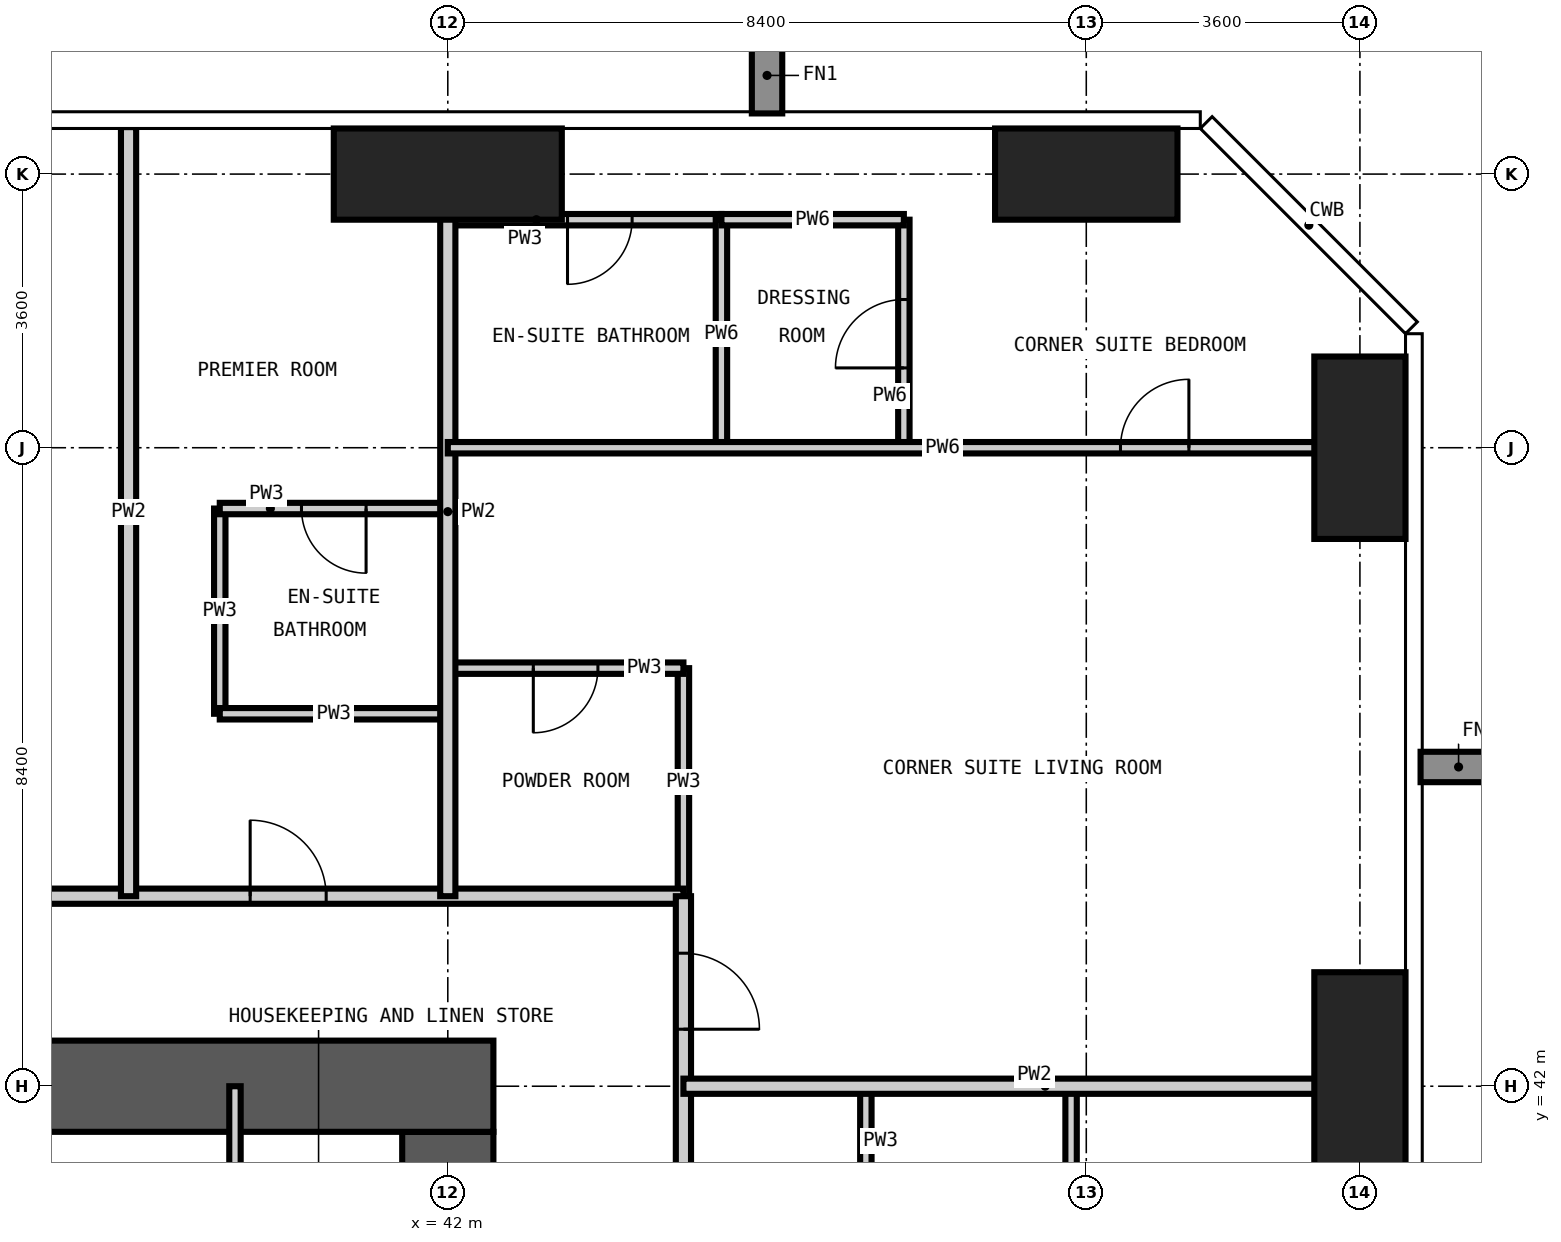
"""IFC4 building model, lengths in metres.
Left out: names, types, materials, properties, quantities, classifications, styles, units other than length and angle.
Written with IfcOpenShell. Run it as: python <this file> out.ifc"""

import sys

from ifc_helpers import new_model, si_unit, direction, frame, frame_2d, origin, origin_2d, place, context, subcontext, project, spatial, rectangle, extrude, element, fill, save


model = new_model("IFC4")
c1 = context("Model", 3, precision=1e-05, world=origin(), true_north=direction((0.0, 1.0)))
c2 = subcontext(c1, "Body", "Model", "MODEL_VIEW")
j1 = project(units=[si_unit("LENGTHUNIT", "METRE"), si_unit("PLANEANGLEUNIT", "RADIAN")], contexts=[c1])
p1 = place(None, origin())
s1 = spatial("IfcSite", under=j1, at=p1, CompositionType="ELEMENT")
p2 = place(p1, origin())
s2 = spatial("IfcBuilding", under=s1, at=p2, CompositionType="ELEMENT")
p3 = place(p2, frame((0.0, 0.0, 144.0)))
s3 = spatial("IfcBuildingStorey", under=s2, at=p3, CompositionType="ELEMENT", Elevation=144.0)
p4 = place(p3, frame((42.0, 54.0, -0.35), z_axis=(0.0, 0.0, 1.0), x_axis=(1.0, 0.0, 0.0)))
e1 = element("IfcColumn", 1, at=p4, inside=s3, PredefinedType="COLUMN", context=c2, shape_type="SweptSolid", body=[
    extrude(rectangle(XDim=3.0, YDim=1.2, at=origin_2d()), origin(), (0.0, 0.0, 1.0), 3.6),
])
p5 = place(p3, frame((50.4, 54.0, -0.35), z_axis=(0.0, 0.0, 1.0), x_axis=(1.0, 0.0, 0.0)))
e2 = element("IfcColumn", 2, at=p5, inside=s3, PredefinedType="COLUMN", context=c2, shape_type="SweptSolid", body=[
    extrude(rectangle(XDim=2.4, YDim=1.2, at=origin_2d()), origin(), (0.0, 0.0, 1.0), 3.6),
])
p6 = place(p3, frame((54.0, 42.0, -0.35), z_axis=(0.0, 0.0, 1.0), x_axis=(1.0, 0.0, 0.0)))
e3 = element("IfcColumn", 3, at=p6, inside=s3, PredefinedType="COLUMN", context=c2, shape_type="SweptSolid", body=[
    extrude(rectangle(XDim=1.2, YDim=3.0, at=origin_2d()), origin(), (0.0, 0.0, 1.0), 3.6),
])
p7 = place(p3, frame((54.0, 50.4, -0.35), z_axis=(0.0, 0.0, 1.0), x_axis=(1.0, 0.0, 0.0)))
e4 = element("IfcColumn", 4, at=p7, inside=s3, PredefinedType="COLUMN", context=c2, shape_type="SweptSolid", body=[
    extrude(rectangle(XDim=1.2, YDim=2.4, at=origin_2d()), origin(), (0.0, 0.0, 1.0), 3.6),
])
p8 = place(p3, frame((42.0, 17.4, -0.35), z_axis=(0.0, 0.0, 1.0), x_axis=(0.0, 1.0, 0.0)))
e5 = element("IfcWall", 5, at=p8, inside=s3, PredefinedType="SHEAR", context=c2, shape_type="SweptSolid", body=[
    extrude(rectangle(XDim=24.0, YDim=1.2, at=frame_2d((12.0, 0.0))), origin(), (0.0, 0.0, 1.0), 3.6),
])
p9 = place(p8, frame((0.2, 0.0, 0.35)))
e6 = element("IfcOpeningElement", 6, at=p9, cuts=e5, PredefinedType="OPENING", context=c2, shape_type="SweptSolid", body=[
    extrude(rectangle(XDim=1.2, YDim=2.2, at=frame_2d((0.6, 1.1))), frame((0.0, 0.61, 0.0), z_axis=(0.0, -1.0, 0.0), x_axis=(1.0, 0.0, 0.0)), (0.0, 0.0, 1.0), 1.22),
])
p10 = place(p8, frame((11.1, 0.0, 0.35)))
e7 = element("IfcOpeningElement", 7, at=p10, cuts=e5, PredefinedType="OPENING", context=c2, shape_type="SweptSolid", body=[
    extrude(rectangle(XDim=1.8, YDim=2.2, at=frame_2d((0.9, 1.1))), frame((0.0, 0.61, 0.0), z_axis=(0.0, -1.0, 0.0), x_axis=(1.0, 0.0, 0.0)), (0.0, 0.0, 1.0), 1.22),
])
p11 = place(p8, frame((19.9, 0.0, 0.35)))
e8 = element("IfcOpeningElement", 8, at=p11, cuts=e5, PredefinedType="OPENING", context=c2, shape_type="SweptSolid", body=[
    extrude(rectangle(XDim=1.0, YDim=2.1, at=frame_2d((0.5, 1.05))), frame((0.0, 0.61, 0.0), z_axis=(0.0, -1.0, 0.0), x_axis=(1.0, 0.0, 0.0)), (0.0, 0.0, 1.0), 1.22),
])
p12 = place(p3, frame((42.6, 42.0, -0.35), z_axis=(0.0, 0.0, 1.0), x_axis=(-1.0, 0.0, 0.0)))
e9 = element("IfcWall", 9, at=p12, inside=s3, PredefinedType="SHEAR", context=c2, shape_type="SweptSolid", body=[
    extrude(rectangle(XDim=26.4, YDim=1.2, at=frame_2d((13.2, 0.0))), origin(), (0.0, 0.0, 1.0), 3.6),
])
p13 = place(p12, frame((21.1, 0.0, 0.35)))
e10 = element("IfcOpeningElement", 10, at=p13, cuts=e9, PredefinedType="OPENING", context=c2, shape_type="SweptSolid", body=[
    extrude(rectangle(XDim=1.0, YDim=2.1, at=frame_2d((0.5, 1.05))), frame((0.0, 0.61, 0.0), z_axis=(0.0, -1.0, 0.0), x_axis=(1.0, 0.0, 0.0)), (0.0, 0.0, 1.0), 1.22),
])
p14 = place(p12, frame((10.5, 0.0, 0.35)))
e11 = element("IfcOpeningElement", 11, at=p14, cuts=e9, PredefinedType="OPENING", context=c2, shape_type="SweptSolid", body=[
    extrude(rectangle(XDim=1.2, YDim=2.2, at=frame_2d((0.6, 1.1))), frame((0.0, 0.61, 0.0), z_axis=(0.0, -1.0, 0.0), x_axis=(1.0, 0.0, 0.0)), (0.0, 0.0, 1.0), 1.22),
])
p15 = place(p3, frame((39.0, 46.9, 0.0), z_axis=(0.0, 0.0, 1.0), x_axis=(0.0, 1.0, 0.0)))
e12 = element("IfcWall", 12, at=p15, inside=s3, PredefinedType="PARTITIONING", context=c2, shape_type="SweptSolid", body=[
    extrude(rectangle(XDim=2.7, YDim=0.15, at=frame_2d((1.35, 0.0))), origin(), (0.0, 0.0, 1.0), 3.25),
])
p16 = place(p3, frame((45.1, 44.5, 0.0), z_axis=(0.0, 0.0, 1.0), x_axis=(0.0, 1.0, 0.0)))
e13 = element("IfcWall", 13, at=p16, inside=s3, PredefinedType="PARTITIONING", context=c2, shape_type="SweptSolid", body=[
    extrude(rectangle(XDim=3.0, YDim=0.15, at=frame_2d((1.5, 0.0))), origin(), (0.0, 0.0, 1.0), 3.25),
])
p17 = place(p3, frame((47.5, 39.0, 0.0), z_axis=(0.0, 0.0, 1.0), x_axis=(0.0, 1.0, 0.0)))
e14 = element("IfcWall", 14, at=p17, inside=s3, PredefinedType="PARTITIONING", context=c2, shape_type="SweptSolid", body=[
    extrude(rectangle(XDim=3.0, YDim=0.15, at=frame_2d((1.5, 0.0))), origin(), (0.0, 0.0, 1.0), 3.25),
])
p18 = place(p17, frame((1.075, 0.0, 0.0)))
e15 = element("IfcOpeningElement", 15, at=p18, cuts=e14, PredefinedType="OPENING", context=c2, shape_type="SweptSolid", body=[
    extrude(rectangle(XDim=0.85, YDim=2.1, at=frame_2d((0.425, 1.05))), frame((0.0, 0.085, 0.0), z_axis=(0.0, -1.0, 0.0), x_axis=(1.0, 0.0, 0.0)), (0.0, 0.0, 1.0), 0.17),
])
for number, where, z_axis, x_axis in (
    (16, (50.2, 39.0, 0.0), (0.0, 0.0, 1.0), (0.0, 1.0, 0.0)),
    (17, (39.0, 46.9, 0.0), (0.0, 0.0, 1.0), (1.0, 0.0, 0.0)),
):
    element("IfcWall", number, at=place(p3, frame(where, z_axis=z_axis, x_axis=x_axis)), inside=s3, PredefinedType="PARTITIONING", context=c2, shape_type="SweptSolid", body=[
        extrude(rectangle(XDim=3.0, YDim=0.15, at=frame_2d((1.5, 0.0))), origin(), (0.0, 0.0, 1.0), 3.25),
    ])
p19 = place(p3, frame((42.0, 47.5, 0.0), z_axis=(0.0, 0.0, 1.0), x_axis=(1.0, 0.0, 0.0)))
e18 = element("IfcWall", 18, at=p19, inside=s3, PredefinedType="PARTITIONING", context=c2, shape_type="SweptSolid", body=[
    extrude(rectangle(XDim=3.1, YDim=0.15, at=frame_2d((1.55, 0.0))), origin(), (0.0, 0.0, 1.0), 3.25),
])
p20 = place(p19, frame((1.125, 0.0, 0.0)))
e19 = element("IfcOpeningElement", 19, at=p20, cuts=e18, PredefinedType="OPENING", context=c2, shape_type="SweptSolid", body=[
    extrude(rectangle(XDim=0.85, YDim=2.1, at=frame_2d((0.425, 1.05))), frame((0.0, 0.085, 0.0), z_axis=(0.0, -1.0, 0.0), x_axis=(1.0, 0.0, 0.0)), (0.0, 0.0, 1.0), 0.17),
])
p21 = place(p3, frame((39.0, 49.6, 0.0), z_axis=(0.0, 0.0, 1.0), x_axis=(1.0, 0.0, 0.0)))
e20 = element("IfcWall", 20, at=p21, inside=s3, PredefinedType="PARTITIONING", context=c2, shape_type="SweptSolid", body=[
    extrude(rectangle(XDim=3.0, YDim=0.15, at=frame_2d((1.5, 0.0))), origin(), (0.0, 0.0, 1.0), 3.25),
])
p22 = place(p21, frame((1.075, 0.0, 0.0)))
e21 = element("IfcOpeningElement", 21, at=p22, cuts=e20, PredefinedType="OPENING", context=c2, shape_type="SweptSolid", body=[
    extrude(rectangle(XDim=0.85, YDim=2.1, at=frame_2d((0.425, 1.05))), frame((0.0, 0.085, 0.0), z_axis=(0.0, -1.0, 0.0), x_axis=(1.0, 0.0, 0.0)), (0.0, 0.0, 1.0), 0.17),
])
p23 = place(p3, frame((42.0, 53.4, 0.0), z_axis=(0.0, 0.0, 1.0), x_axis=(1.0, 0.0, 0.0)))
e22 = element("IfcWall", 22, at=p23, inside=s3, PredefinedType="PARTITIONING", context=c2, shape_type="SweptSolid", body=[
    extrude(rectangle(XDim=3.6, YDim=0.15, at=frame_2d((1.8, 0.0))), origin(), (0.0, 0.0, 1.0), 3.25),
])
p24 = place(p23, frame((1.575, 0.0, 0.0)))
e23 = element("IfcOpeningElement", 23, at=p24, cuts=e22, PredefinedType="OPENING", context=c2, shape_type="SweptSolid", body=[
    extrude(rectangle(XDim=0.85, YDim=2.1, at=frame_2d((0.425, 1.05))), frame((0.0, 0.085, 0.0), z_axis=(0.0, -1.0, 0.0), x_axis=(1.0, 0.0, 0.0)), (0.0, 0.0, 1.0), 0.17),
])
p25 = place(p3, frame((12.6, 44.5, 0.0), z_axis=(0.0, 0.0, 1.0), x_axis=(1.0, 0.0, 0.0)))
e24 = element("IfcWall", 24, at=p25, inside=s3, PredefinedType="PARTITIONING", context=c2, shape_type="SweptSolid", body=[
    extrude(rectangle(XDim=32.5, YDim=0.2, at=frame_2d((16.25, 0.0))), origin(), (0.0, 0.0, 1.0), 3.25),
])
p26 = place(p25, frame((5.8, 0.0, 0.0)))
e25 = element("IfcOpeningElement", 25, at=p26, cuts=e24, PredefinedType="OPENING", context=c2, shape_type="SweptSolid", body=[
    extrude(rectangle(XDim=1.0, YDim=2.2, at=frame_2d((0.5, 1.1))), frame((0.0, 0.11, 0.0), z_axis=(0.0, -1.0, 0.0), x_axis=(1.0, 0.0, 0.0)), (0.0, 0.0, 1.0), 0.22),
])
p27 = place(p25, frame((12.1, 0.0, 0.0)))
e26 = element("IfcOpeningElement", 26, at=p27, cuts=e24, PredefinedType="OPENING", context=c2, shape_type="SweptSolid", body=[
    extrude(rectangle(XDim=1.0, YDim=2.2, at=frame_2d((0.5, 1.1))), frame((0.0, 0.11, 0.0), z_axis=(0.0, -1.0, 0.0), x_axis=(1.0, 0.0, 0.0)), (0.0, 0.0, 1.0), 0.22),
])
p28 = place(p25, frame((20.5, 0.0, 0.0)))
e27 = element("IfcOpeningElement", 27, at=p28, cuts=e24, PredefinedType="OPENING", context=c2, shape_type="SweptSolid", body=[
    extrude(rectangle(XDim=1.0, YDim=2.2, at=frame_2d((0.5, 1.1))), frame((0.0, 0.11, 0.0), z_axis=(0.0, -1.0, 0.0), x_axis=(1.0, 0.0, 0.0)), (0.0, 0.0, 1.0), 0.22),
])
p29 = place(p25, frame((26.8, 0.0, 0.0)))
e28 = element("IfcOpeningElement", 28, at=p29, cuts=e24, PredefinedType="OPENING", context=c2, shape_type="SweptSolid", body=[
    extrude(rectangle(XDim=1.0, YDim=2.2, at=frame_2d((0.5, 1.1))), frame((0.0, 0.11, 0.0), z_axis=(0.0, -1.0, 0.0), x_axis=(1.0, 0.0, 0.0)), (0.0, 0.0, 1.0), 0.22),
])
p30 = place(p3, frame((45.1, 44.5, 0.0), z_axis=(0.0, 0.0, 1.0), x_axis=(0.0, -1.0, 0.0)))
e29 = element("IfcWall", 29, at=p30, inside=s3, PredefinedType="PARTITIONING", context=c2, shape_type="SweptSolid", body=[
    extrude(rectangle(XDim=31.4, YDim=0.2, at=frame_2d((15.7, 0.0))), origin(), (0.0, 0.0, 1.0), 3.25),
])
p31 = place(p30, frame((24.2, 0.0, 0.0)))
e30 = element("IfcOpeningElement", 30, at=p31, cuts=e29, PredefinedType="OPENING", context=c2, shape_type="SweptSolid", body=[
    extrude(rectangle(XDim=1.0, YDim=2.2, at=frame_2d((0.5, 1.1))), frame((0.0, 0.11, 0.0), z_axis=(0.0, -1.0, 0.0), x_axis=(1.0, 0.0, 0.0)), (0.0, 0.0, 1.0), 0.22),
])
p32 = place(p30, frame((13.4, 0.0, 0.0)))
e31 = element("IfcOpeningElement", 31, at=p32, cuts=e29, PredefinedType="OPENING", context=c2, shape_type="SweptSolid", body=[
    extrude(rectangle(XDim=1.0, YDim=2.2, at=frame_2d((0.5, 1.1))), frame((0.0, 0.11, 0.0), z_axis=(0.0, -1.0, 0.0), x_axis=(1.0, 0.0, 0.0)), (0.0, 0.0, 1.0), 0.22),
])
p33 = place(p30, frame((7.4, 0.0, 0.0)))
e32 = element("IfcOpeningElement", 32, at=p33, cuts=e29, PredefinedType="OPENING", context=c2, shape_type="SweptSolid", body=[
    extrude(rectangle(XDim=1.0, YDim=2.2, at=frame_2d((0.5, 1.1))), frame((0.0, 0.11, 0.0), z_axis=(0.0, -1.0, 0.0), x_axis=(1.0, 0.0, 0.0)), (0.0, 0.0, 1.0), 0.22),
])
p34 = place(p30, frame((29.05, 0.0, 0.0)))
e33 = element("IfcOpeningElement", 33, at=p34, cuts=e29, PredefinedType="OPENING", context=c2, shape_type="SweptSolid", body=[
    extrude(rectangle(XDim=1.0, YDim=2.2, at=frame_2d((0.5, 1.1))), frame((0.0, 0.11, 0.0), z_axis=(0.0, -1.0, 0.0), x_axis=(1.0, 0.0, 0.0)), (0.0, 0.0, 1.0), 0.22),
])
p35 = place(p30, frame((0.75, 0.0, 0.0)))
e34 = element("IfcOpeningElement", 34, at=p35, cuts=e29, PredefinedType="OPENING", context=c2, shape_type="SweptSolid", body=[
    extrude(rectangle(XDim=1.0, YDim=2.2, at=frame_2d((0.5, 1.1))), frame((0.0, 0.11, 0.0), z_axis=(0.0, -1.0, 0.0), x_axis=(1.0, 0.0, 0.0)), (0.0, 0.0, 1.0), 0.22),
])
for number, where, z_axis, x_axis in (
    (35, (37.8, 44.5, 0.0), (0.0, 0.0, 1.0), (0.0, 1.0, 0.0)),
    (36, (42.0, 44.5, 0.0), (0.0, 0.0, 1.0), (0.0, 1.0, 0.0)),
):
    element("IfcWall", number, at=place(p3, frame(where, z_axis=z_axis, x_axis=x_axis)), inside=s3, PredefinedType="PARTITIONING", context=c2, shape_type="SweptSolid", body=[
        extrude(rectangle(XDim=10.118, YDim=0.2, at=frame_2d((5.059, 0.0))), origin(), (0.0, 0.0, 1.0), 3.25),
    ])
p36 = place(p3, frame((45.1, 42.0, 0.0), z_axis=(0.0, 0.0, 1.0), x_axis=(1.0, 0.0, 0.0)))
e37 = element("IfcWall", 37, at=p36, inside=s3, PredefinedType="PARTITIONING", context=c2, shape_type="SweptSolid", body=[
    extrude(rectangle(XDim=9.518, YDim=0.2, at=frame_2d((4.759, 0.0))), origin(), (0.0, 0.0, 1.0), 3.25),
])
p37 = place(p3, frame((39.2, 33.6, 0.0), z_axis=(0.0, 0.0, 1.0), x_axis=(0.0, 1.0, 0.0)))
e38 = element("IfcWall", 38, at=p37, inside=s3, PredefinedType="PARTITIONING", context=c2, shape_type="SweptSolid", body=[
    extrude(rectangle(XDim=8.4, YDim=0.15, at=frame_2d((4.2, 0.0))), origin(), (0.0, 0.0, 1.0), 3.25),
])
p38 = place(p37, frame((3.7, 0.0, 0.0)))
e39 = element("IfcOpeningElement", 39, at=p38, cuts=e38, PredefinedType="OPENING", context=c2, shape_type="SweptSolid", body=[
    extrude(rectangle(XDim=1.0, YDim=2.1, at=frame_2d((0.5, 1.05))), frame((0.0, 0.085, 0.0), z_axis=(0.0, -1.0, 0.0), x_axis=(1.0, 0.0, 0.0)), (0.0, 0.0, 1.0), 0.17),
])
p39 = place(p3, frame((45.6, 50.4, 0.0), z_axis=(0.0, 0.0, 1.0), x_axis=(0.0, 1.0, 0.0)))
e40 = element("IfcWall", 40, at=p39, inside=s3, PredefinedType="PARTITIONING", context=c2, shape_type="SweptSolid", body=[
    extrude(rectangle(XDim=3.0, YDim=0.15, at=frame_2d((1.5, 0.0))), origin(), (0.0, 0.0, 1.0), 3.25),
])
p40 = place(p3, frame((48.0, 50.4, 0.0), z_axis=(0.0, 0.0, 1.0), x_axis=(0.0, 1.0, 0.0)))
e41 = element("IfcWall", 41, at=p40, inside=s3, PredefinedType="PARTITIONING", context=c2, shape_type="SweptSolid", body=[
    extrude(rectangle(XDim=3.0, YDim=0.15, at=frame_2d((1.5, 0.0))), origin(), (0.0, 0.0, 1.0), 3.25),
])
p41 = place(p40, frame((1.05, 0.0, 0.0)))
e42 = element("IfcOpeningElement", 42, at=p41, cuts=e41, PredefinedType="OPENING", context=c2, shape_type="SweptSolid", body=[
    extrude(rectangle(XDim=0.9, YDim=2.1, at=frame_2d((0.45, 1.05))), frame((0.0, 0.085, 0.0), z_axis=(0.0, -1.0, 0.0), x_axis=(1.0, 0.0, 0.0)), (0.0, 0.0, 1.0), 0.17),
])
p42 = place(p3, frame((42.0, 50.4, 0.0), z_axis=(0.0, 0.0, 1.0), x_axis=(1.0, 0.0, 0.0)))
e43 = element("IfcWall", 43, at=p42, inside=s3, PredefinedType="PARTITIONING", context=c2, shape_type="SweptSolid", body=[
    extrude(rectangle(XDim=12.618, YDim=0.15, at=frame_2d((6.309, 0.0))), origin(), (0.0, 0.0, 1.0), 3.25),
])
p43 = place(p42, frame((8.85, 0.0, 0.0)))
e44 = element("IfcOpeningElement", 44, at=p43, cuts=e43, PredefinedType="OPENING", context=c2, shape_type="SweptSolid", body=[
    extrude(rectangle(XDim=0.9, YDim=2.1, at=frame_2d((0.45, 1.05))), frame((0.0, 0.085, 0.0), z_axis=(0.0, -1.0, 0.0), x_axis=(1.0, 0.0, 0.0)), (0.0, 0.0, 1.0), 0.17),
])
p44 = place(p3, frame((45.6, 53.4, 0.0), z_axis=(0.0, 0.0, 1.0), x_axis=(1.0, 0.0, 0.0)))
e45 = element("IfcWall", 45, at=p44, inside=s3, PredefinedType="PARTITIONING", context=c2, shape_type="SweptSolid", body=[
    extrude(rectangle(XDim=2.4, YDim=0.15, at=frame_2d((1.2, 0.0))), origin(), (0.0, 0.0, 1.0), 3.25),
])
p45 = place(p29, origin())
e46 = element("IfcDoor", 46, at=p45, inside=s3, OperationType="SINGLE_SWING_LEFT", PredefinedType="DOOR", context=c2, shape_type="SweptSolid", body=[
    extrude(rectangle(XDim=1.0, YDim=2.2, at=frame_2d((0.5, 1.1))), frame((0.0, 0.025, 0.0), z_axis=(0.0, -1.0, 0.0), x_axis=(1.0, 0.0, 0.0)), (0.0, 0.0, 1.0), 0.05),
])
fill(e28, e46)
p46 = place(p22, frame((0.85, 0.0, 0.0), z_axis=(0.0, 0.0, 1.0), x_axis=(-1.0, 0.0, 0.0)))
e47 = element("IfcDoor", 47, at=p46, inside=s3, OperationType="SINGLE_SWING_LEFT", PredefinedType="DOOR", context=c2, shape_type="SweptSolid", body=[
    extrude(rectangle(XDim=0.85, YDim=2.1, at=frame_2d((0.425, 1.05))), frame((0.0, 0.025, 0.0), z_axis=(0.0, -1.0, 0.0), x_axis=(1.0, 0.0, 0.0)), (0.0, 0.0, 1.0), 0.05),
])
fill(e21, e47)
p47 = place(p35, origin())
e48 = element("IfcDoor", 48, at=p47, inside=s3, OperationType="SINGLE_SWING_RIGHT", PredefinedType="DOOR", context=c2, shape_type="SweptSolid", body=[
    extrude(rectangle(XDim=1.0, YDim=2.2, at=frame_2d((0.5, 1.1))), frame((0.0, 0.025, 0.0), z_axis=(0.0, -1.0, 0.0), x_axis=(1.0, 0.0, 0.0)), (0.0, 0.0, 1.0), 0.05),
])
fill(e34, e48)
p48 = place(p20, frame((0.85, 0.0, 0.0), z_axis=(0.0, 0.0, 1.0), x_axis=(-1.0, 0.0, 0.0)))
e49 = element("IfcDoor", 49, at=p48, inside=s3, OperationType="SINGLE_SWING_RIGHT", PredefinedType="DOOR", context=c2, shape_type="SweptSolid", body=[
    extrude(rectangle(XDim=0.85, YDim=2.1, at=frame_2d((0.425, 1.05))), frame((0.0, 0.025, 0.0), z_axis=(0.0, -1.0, 0.0), x_axis=(1.0, 0.0, 0.0)), (0.0, 0.0, 1.0), 0.05),
])
fill(e19, e49)
p49 = place(p43, origin())
e50 = element("IfcDoor", 50, at=p49, inside=s3, OperationType="SINGLE_SWING_RIGHT", PredefinedType="DOOR", context=c2, shape_type="SweptSolid", body=[
    extrude(rectangle(XDim=0.9, YDim=2.1, at=frame_2d((0.45, 1.05))), frame((0.0, 0.025, 0.0), z_axis=(0.0, -1.0, 0.0), x_axis=(1.0, 0.0, 0.0)), (0.0, 0.0, 1.0), 0.05),
])
fill(e44, e50)
p50 = place(p24, frame((0.85, 0.0, 0.0), z_axis=(0.0, 0.0, 1.0), x_axis=(-1.0, 0.0, 0.0)))
e51 = element("IfcDoor", 51, at=p50, inside=s3, OperationType="SINGLE_SWING_RIGHT", PredefinedType="DOOR", context=c2, shape_type="SweptSolid", body=[
    extrude(rectangle(XDim=0.85, YDim=2.1, at=frame_2d((0.425, 1.05))), frame((0.0, 0.025, 0.0), z_axis=(0.0, -1.0, 0.0), x_axis=(1.0, 0.0, 0.0)), (0.0, 0.0, 1.0), 0.05),
])
fill(e23, e51)
p51 = place(p41, origin())
e52 = element("IfcDoor", 52, at=p51, inside=s3, OperationType="SINGLE_SWING_LEFT", PredefinedType="DOOR", context=c2, shape_type="SweptSolid", body=[
    extrude(rectangle(XDim=0.9, YDim=2.1, at=frame_2d((0.45, 1.05))), frame((0.0, 0.025, 0.0), z_axis=(0.0, -1.0, 0.0), x_axis=(1.0, 0.0, 0.0)), (0.0, 0.0, 1.0), 0.05),
])
fill(e42, e52)
save(model, sys.argv[1])
